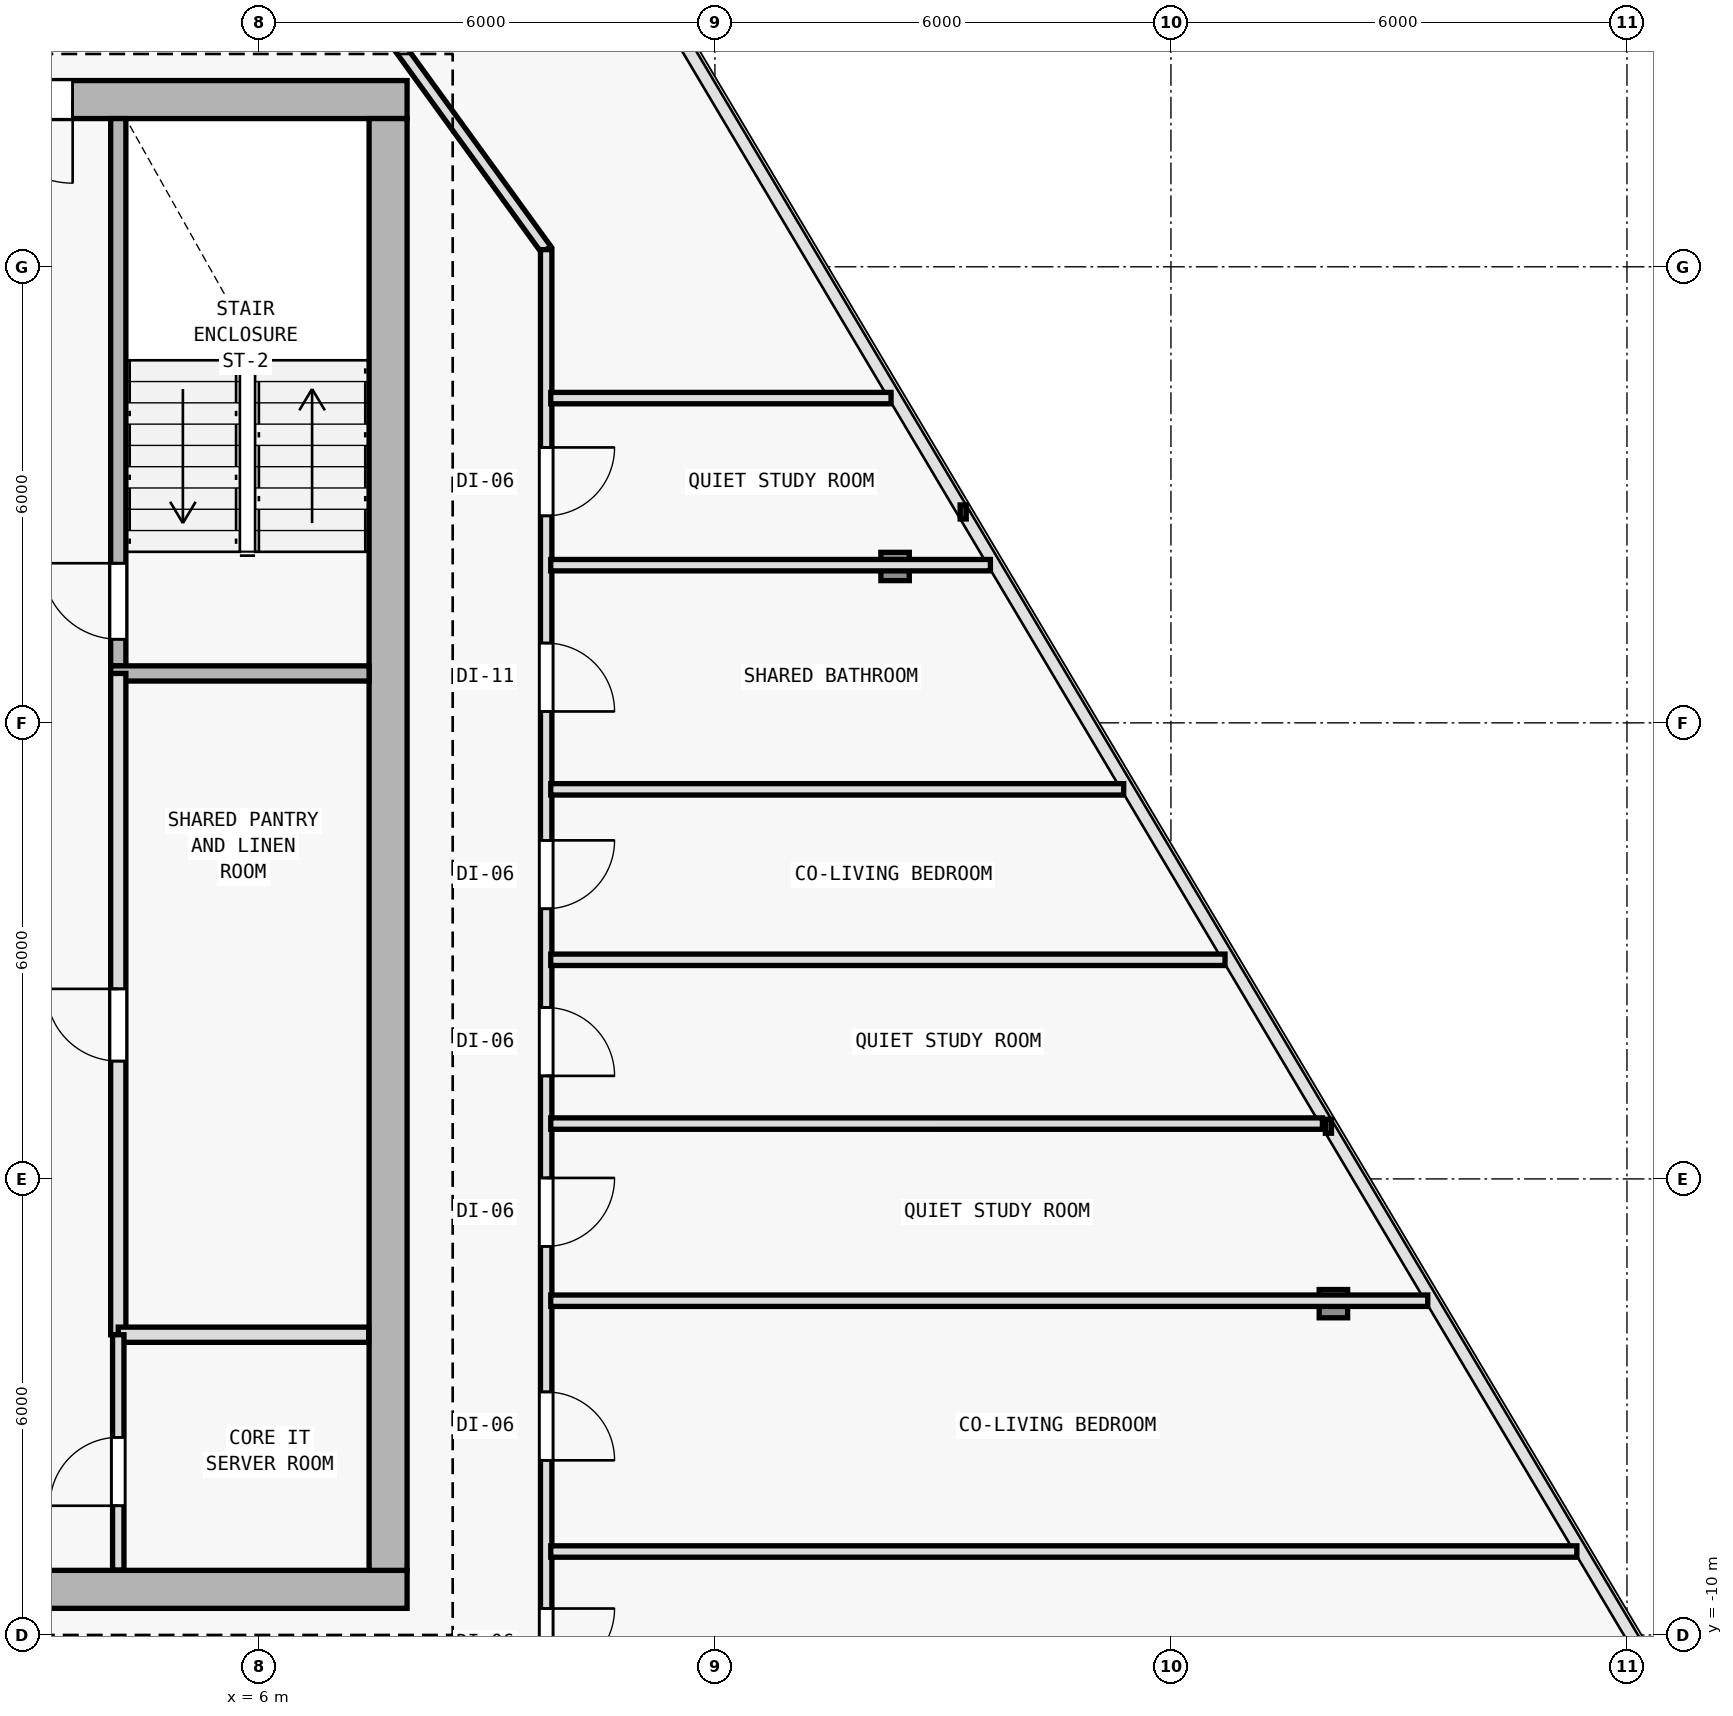
"""IFC4 building model, lengths in metres.
Left out: names, types, materials, properties, quantities, classifications, styles, units other than length and angle.
Written with IfcOpenShell. Run it as: python <this file> out.ifc"""

import sys

from ifc_helpers import new_model, si_unit, direction, frame, frame_2d, origin, origin_2d, place, context, subcontext, project, spatial, rectangle, i_section, extrude, element, fill, save


model = new_model("IFC4")
c1 = context("Model", 3, precision=1e-05, world=origin(), true_north=direction((0.0, 1.0)))
c2 = subcontext(c1, "Body", "Model", "MODEL_VIEW")
j1 = project(units=[si_unit("LENGTHUNIT", "METRE"), si_unit("PLANEANGLEUNIT", "RADIAN")], contexts=[c1])
p1 = place(None, origin())
s1 = spatial("IfcSite", under=j1, at=p1, CompositionType="ELEMENT")
p2 = place(p1, origin())
s2 = spatial("IfcBuilding", under=s1, at=p2, CompositionType="ELEMENT")
p3 = place(p2, frame((0.0, 0.0, 227.1)))
s3 = spatial("IfcBuildingStorey", under=s2, at=p3, CompositionType="ELEMENT", Elevation=227.1)
for number, where, z_axis, x_axis in (
    (1, (7.7, -9.4, 0.0), (0.0, 0.0, 1.0), (1.0, 0.0, 0.0)),
    (2, (7.7, 10.2, 0.0), (0.0, 0.0, 1.0), (1.0, 0.0, 0.0)),
    (3, (7.7, 0.4, 0.0), (0.0, 0.0, 1.0), (1.0, 0.0, 0.0)),
):
    element("IfcColumn", number, at=place(p3, frame(where, z_axis=z_axis, x_axis=x_axis)), inside=s3, PredefinedType="COLUMN", context=c2, shape_type="SweptSolid", body=[
        extrude(i_section(OverallWidth=0.398, OverallDepth=0.387, WebThickness=0.013, FlangeThickness=0.022, FilletRadius=0.015, at=origin_2d()), origin(), (0.0, 0.0, 1.0), 3.6),
    ])
p4 = place(p3, frame((20.138, -5.641, 0.005), z_axis=(-0.026105663043, 0.021618752208, 0.999425396871), x_axis=(-0.637813971185, -0.770190455771, 0.0)))
e4 = element("IfcColumn", 4, at=p4, inside=s3, PredefinedType="COLUMN", context=c2, shape_type="SweptSolid", body=[
    extrude(i_section(OverallWidth=0.374, OverallDepth=0.372, WebThickness=0.012, FlangeThickness=0.02, FilletRadius=0.015, at=origin_2d()), origin(), (0.0, 0.0, 1.0), 3.591),
])
p5 = place(p3, frame((14.371, 4.057, 0.005), z_axis=(-0.018906041, 0.009521027842, 0.999775930718), x_axis=(-0.449781931574, -0.893138406984, 0.0)))
e5 = element("IfcColumn", 5, at=p5, inside=s3, PredefinedType="COLUMN", context=c2, shape_type="SweptSolid", body=[
    extrude(i_section(OverallWidth=0.374, OverallDepth=0.372, WebThickness=0.012, FlangeThickness=0.02, FilletRadius=0.015, at=origin_2d()), origin(), (0.0, 0.0, 1.0), 3.59),
])
p6 = place(p3, frame((-7.95, -9.4, 0.0), z_axis=(0.0, 0.0, 1.0), x_axis=(1.0, 0.0, 0.0)))
e6 = element("IfcWall", 6, at=p6, inside=s3, PredefinedType="SHEAR", context=c2, shape_type="SweptSolid", body=[
    extrude(rectangle(XDim=15.9, YDim=0.5, at=frame_2d((7.95, 0.0))), origin(), (0.0, 0.0, 1.0), 3.35),
])
p7 = place(p6, frame((9.6, 0.0, 0.0)))
e7 = element("IfcOpeningElement", 7, at=p7, cuts=e6, PredefinedType="OPENING", context=c2, shape_type="SweptSolid", body=[
    extrude(rectangle(XDim=1.5, YDim=2.2, at=frame_2d((0.75, 1.1))), frame((0.0, 0.26, 0.0), z_axis=(0.0, -1.0, 0.0), x_axis=(1.0, 0.0, 0.0)), (0.0, 0.0, 1.0), 0.52),
])
p8 = place(p3, frame((7.95, 10.2, 0.0), z_axis=(0.0, 0.0, 1.0), x_axis=(-1.0, 0.0, 0.0)))
e8 = element("IfcWall", 8, at=p8, inside=s3, PredefinedType="SHEAR", context=c2, shape_type="SweptSolid", body=[
    extrude(rectangle(XDim=15.9, YDim=0.5, at=frame_2d((7.95, 0.0))), origin(), (0.0, 0.0, 1.0), 3.35),
])
p9 = place(p8, frame((4.4, 0.0, 0.0)))
e9 = element("IfcOpeningElement", 9, at=p9, cuts=e8, PredefinedType="OPENING", context=c2, shape_type="SweptSolid", body=[
    extrude(rectangle(XDim=1.1, YDim=2.15, at=frame_2d((0.55, 1.075))), frame((0.0, 0.26, 0.0), z_axis=(0.0, -1.0, 0.0), x_axis=(1.0, 0.0, 0.0)), (0.0, 0.0, 1.0), 0.52),
])
p10 = place(p3, frame((7.7, 9.95, 0.0), z_axis=(0.0, 0.0, 1.0), x_axis=(0.0, -1.0, 0.0)))
e10 = element("IfcWall", 10, at=p10, inside=s3, PredefinedType="SHEAR", context=c2, shape_type="SweptSolid", body=[
    extrude(rectangle(XDim=19.1, YDim=0.5, at=frame_2d((9.55, 0.0))), origin(), (0.0, 0.0, 1.0), 3.35),
])
p11 = place(p3, frame((4.15, 2.75, 0.0), z_axis=(0.0, 0.0, 1.0), x_axis=(0.0, 1.0, 0.0)))
e11 = element("IfcWall", 11, at=p11, inside=s3, PredefinedType="SOLIDWALL", context=c2, shape_type="SweptSolid", body=[
    extrude(rectangle(XDim=7.2, YDim=0.2, at=frame_2d((3.6, 0.0))), origin(), (0.0, 0.0, 1.0), 3.35),
])
p12 = place(p11, frame((0.35, 0.0, 0.0)))
e12 = element("IfcOpeningElement", 12, at=p12, cuts=e11, PredefinedType="OPENING", context=c2, shape_type="SweptSolid", body=[
    extrude(rectangle(XDim=1.0, YDim=2.15, at=frame_2d((0.5, 1.075))), frame((0.0, 0.11, 0.0), z_axis=(0.0, -1.0, 0.0), x_axis=(1.0, 0.0, 0.0)), (0.0, 0.0, 1.0), 0.22),
])
p13 = place(p3, frame((4.05, 2.65, 0.0), z_axis=(0.0, 0.0, 1.0), x_axis=(1.0, 0.0, 0.0)))
e13 = element("IfcWall", 13, at=p13, inside=s3, PredefinedType="SOLIDWALL", context=c2, shape_type="SweptSolid", body=[
    extrude(rectangle(XDim=3.4, YDim=0.2, at=frame_2d((1.7, 0.0))), origin(), (0.0, 0.0, 1.0), 3.35),
])
p14 = place(p3, frame((4.15, -6.05, 0.0), z_axis=(0.0, 0.0, 1.0), x_axis=(0.0, 1.0, 0.0)))
e14 = element("IfcWall", 14, at=p14, inside=s3, PredefinedType="SOLIDWALL", context=c2, shape_type="SweptSolid", body=[
    extrude(rectangle(XDim=8.7, YDim=0.2, at=frame_2d((4.35, 0.0))), origin(), (0.0, 0.0, 1.0), 3.35),
])
p15 = place(p14, frame((3.6, 0.0, 0.0)))
e15 = element("IfcOpeningElement", 15, at=p15, cuts=e14, PredefinedType="OPENING", context=c2, shape_type="SweptSolid", body=[
    extrude(rectangle(XDim=0.95, YDim=2.1, at=frame_2d((0.475, 1.05))), frame((0.0, 0.11, 0.0), z_axis=(0.0, -1.0, 0.0), x_axis=(1.0, 0.0, 0.0)), (0.0, 0.0, 1.0), 0.22),
])
p16 = place(p3, frame((4.15, -6.05, 0.0), z_axis=(0.0, 0.0, 1.0), x_axis=(1.0, 0.0, 0.0)))
e16 = element("IfcWall", 16, at=p16, inside=s3, PredefinedType="SOLIDWALL", context=c2, shape_type="SweptSolid", body=[
    extrude(rectangle(XDim=3.295, YDim=0.2, at=frame_2d((1.647, 0.0))), origin(), (0.0, 0.0, 1.0), 3.35),
])
p17 = place(p3, frame((4.15, -9.145, 0.0), z_axis=(0.0, 0.0, 1.0), x_axis=(0.0, 1.0, 0.0)))
e17 = element("IfcWall", 17, at=p17, inside=s3, PredefinedType="PARTITIONING", context=c2, shape_type="SweptSolid", body=[
    extrude(rectangle(XDim=3.095, YDim=0.15, at=frame_2d((1.547, 0.0))), origin(), (0.0, 0.0, 1.0), 3.35),
])
p18 = place(p17, frame((0.845, 0.0, 0.0)))
e18 = element("IfcOpeningElement", 18, at=p18, cuts=e17, PredefinedType="OPENING", context=c2, shape_type="SweptSolid", body=[
    extrude(rectangle(XDim=0.9, YDim=2.1, at=frame_2d((0.45, 1.05))), frame((0.0, 0.085, 0.0), z_axis=(0.0, -1.0, 0.0), x_axis=(1.0, 0.0, 0.0)), (0.0, 0.0, 1.0), 0.17),
])
p19 = place(p3, frame((6.841, 12.28, 0.0), z_axis=(0.0, 0.0, 1.0), x_axis=(0.586956386413, -0.809618552436, 0.0)))
e19 = element("IfcWall", 19, at=p19, inside=s3, PredefinedType="PARTITIONING", context=c2, shape_type="SweptSolid", body=[
    extrude(rectangle(XDim=5.008, YDim=0.15, at=frame_2d((2.504, 0.0))), origin(), (0.0, 0.0, 1.0), 2.925),
])
p20 = place(p3, frame((9.78, 8.226, 0.0), z_axis=(0.0, 0.0, 1.0), x_axis=(0.0, -1.0, 0.0)))
e20 = element("IfcWall", 20, at=p20, inside=s3, PredefinedType="PARTITIONING", context=c2, shape_type="SweptSolid", body=[
    extrude(rectangle(XDim=19.706, YDim=0.15, at=frame_2d((9.853, 0.0))), origin(), (0.0, 0.0, 1.0), 2.825),
])
p21 = place(p20, frame((17.878, 0.0, 0.0)))
e21 = element("IfcOpeningElement", 21, at=p21, cuts=e20, PredefinedType="OPENING", context=c2, shape_type="SweptSolid", body=[
    extrude(rectangle(XDim=0.9, YDim=2.1, at=frame_2d((0.45, 1.05))), frame((0.0, 0.085, 0.0), z_axis=(0.0, -1.0, 0.0), x_axis=(1.0, 0.0, 0.0)), (0.0, 0.0, 1.0), 0.17),
])
p22 = place(p20, frame((15.028, 0.0, 0.0)))
e22 = element("IfcOpeningElement", 22, at=p22, cuts=e20, PredefinedType="OPENING", context=c2, shape_type="SweptSolid", body=[
    extrude(rectangle(XDim=0.9, YDim=2.1, at=frame_2d((0.45, 1.05))), frame((0.0, 0.085, 0.0), z_axis=(0.0, -1.0, 0.0), x_axis=(1.0, 0.0, 0.0)), (0.0, 0.0, 1.0), 0.17),
])
p23 = place(p20, frame((12.213, 0.0, 0.0)))
e23 = element("IfcOpeningElement", 23, at=p23, cuts=e20, PredefinedType="OPENING", context=c2, shape_type="SweptSolid", body=[
    extrude(rectangle(XDim=0.9, YDim=2.1, at=frame_2d((0.45, 1.05))), frame((0.0, 0.085, 0.0), z_axis=(0.0, -1.0, 0.0), x_axis=(1.0, 0.0, 0.0)), (0.0, 0.0, 1.0), 0.17),
])
p24 = place(p20, frame((9.971, 0.0, 0.0)))
e24 = element("IfcOpeningElement", 24, at=p24, cuts=e20, PredefinedType="OPENING", context=c2, shape_type="SweptSolid", body=[
    extrude(rectangle(XDim=0.9, YDim=2.1, at=frame_2d((0.45, 1.05))), frame((0.0, 0.085, 0.0), z_axis=(0.0, -1.0, 0.0), x_axis=(1.0, 0.0, 0.0)), (0.0, 0.0, 1.0), 0.17),
])
p25 = place(p20, frame((7.772, 0.0, 0.0)))
e25 = element("IfcOpeningElement", 25, at=p25, cuts=e20, PredefinedType="OPENING", context=c2, shape_type="SweptSolid", body=[
    extrude(rectangle(XDim=0.9, YDim=2.1, at=frame_2d((0.45, 1.05))), frame((0.0, 0.085, 0.0), z_axis=(0.0, -1.0, 0.0), x_axis=(1.0, 0.0, 0.0)), (0.0, 0.0, 1.0), 0.17),
])
p26 = place(p20, frame((5.176, 0.0, 0.0)))
e26 = element("IfcOpeningElement", 26, at=p26, cuts=e20, PredefinedType="OPENING", context=c2, shape_type="SweptSolid", body=[
    extrude(rectangle(XDim=0.9, YDim=2.1, at=frame_2d((0.45, 1.05))), frame((0.0, 0.085, 0.0), z_axis=(0.0, -1.0, 0.0), x_axis=(1.0, 0.0, 0.0)), (0.0, 0.0, 1.0), 0.17),
])
p27 = place(p20, frame((2.603, 0.0, 0.0)))
e27 = element("IfcOpeningElement", 27, at=p27, cuts=e20, PredefinedType="OPENING", context=c2, shape_type="SweptSolid", body=[
    extrude(rectangle(XDim=0.9, YDim=2.1, at=frame_2d((0.45, 1.05))), frame((0.0, 0.085, 0.0), z_axis=(0.0, -1.0, 0.0), x_axis=(1.0, 0.0, 0.0)), (0.0, 0.0, 1.0), 0.17),
])
p28 = place(p3, frame((9.84, -5.603, 0.0), z_axis=(0.0, 0.0, 1.0), x_axis=(1.0, 0.0, 0.0)))
e28 = element("IfcWall", 28, at=p28, inside=s3, PredefinedType="PARTITIONING", context=c2, shape_type="SweptSolid", body=[
    extrude(rectangle(XDim=11.539, YDim=0.15, at=frame_2d((5.769, 0.0))), origin(), (0.0, 0.0, 1.0), 2.875),
])
p29 = place(p3, frame((9.84, 4.074, 0.0), z_axis=(0.0, 0.0, 1.0), x_axis=(1.0, 0.0, 0.0)))
e29 = element("IfcWall", 29, at=p29, inside=s3, PredefinedType="PARTITIONING", context=c2, shape_type="SweptSolid", body=[
    extrude(rectangle(XDim=5.784, YDim=0.15, at=frame_2d((2.892, 0.0))), origin(), (0.0, 0.0, 1.0), 2.925),
])
p30 = place(p3, frame((9.84, -1.117, 0.0), z_axis=(0.0, 0.0, 1.0), x_axis=(1.0, 0.0, 0.0)))
e30 = element("IfcWall", 30, at=p30, inside=s3, PredefinedType="PARTITIONING", context=c2, shape_type="SweptSolid", body=[
    extrude(rectangle(XDim=8.872, YDim=0.15, at=frame_2d((4.436, 0.0))), origin(), (0.0, 0.0, 1.0), 2.875),
])
p31 = place(p3, frame((9.84, -8.902, 0.0), z_axis=(0.0, 0.0, 1.0), x_axis=(1.0, 0.0, 0.0)))
e31 = element("IfcWall", 31, at=p31, inside=s3, PredefinedType="PARTITIONING", context=c2, shape_type="SweptSolid", body=[
    extrude(rectangle(XDim=13.501, YDim=0.15, at=frame_2d((6.75, 0.0))), origin(), (0.0, 0.0, 1.0), 2.875),
])
p32 = place(p3, frame((9.84, -3.272, 0.0), z_axis=(0.0, 0.0, 1.0), x_axis=(1.0, 0.0, 0.0)))
e32 = element("IfcWall", 32, at=p32, inside=s3, PredefinedType="PARTITIONING", context=c2, shape_type="SweptSolid", body=[
    extrude(rectangle(XDim=10.153, YDim=0.15, at=frame_2d((5.076, 0.0))), origin(), (0.0, 0.0, 1.0), 2.875),
])
p33 = place(p3, frame((9.84, 1.125, 0.0), z_axis=(0.0, 0.0, 1.0), x_axis=(1.0, 0.0, 0.0)))
e33 = element("IfcWall", 33, at=p33, inside=s3, PredefinedType="PARTITIONING", context=c2, shape_type="SweptSolid", body=[
    extrude(rectangle(XDim=7.538, YDim=0.15, at=frame_2d((3.769, 0.0))), origin(), (0.0, 0.0, 1.0), 2.875),
])
p34 = place(p3, frame((9.84, 6.272, 0.0), z_axis=(0.0, 0.0, 1.0), x_axis=(1.0, 0.0, 0.0)))
e34 = element("IfcWall", 34, at=p34, inside=s3, PredefinedType="PARTITIONING", context=c2, shape_type="SweptSolid", body=[
    extrude(rectangle(XDim=4.477, YDim=0.15, at=frame_2d((2.239, 0.0))), origin(), (0.0, 0.0, 1.0), 2.925),
])
p35 = place(p9, origin())
e35 = element("IfcDoor", 35, at=p35, inside=s3, OperationType="SINGLE_SWING_LEFT", PredefinedType="DOOR", context=c2, shape_type="SweptSolid", body=[
    extrude(rectangle(XDim=1.1, YDim=2.15, at=frame_2d((0.55, 1.075))), frame((0.0, 0.025, 0.0), z_axis=(0.0, -1.0, 0.0), x_axis=(1.0, 0.0, 0.0)), (0.0, 0.0, 1.0), 0.05),
])
fill(e9, e35)
p36 = place(p12, origin())
e36 = element("IfcDoor", 36, at=p36, inside=s3, OperationType="SINGLE_SWING_RIGHT", PredefinedType="DOOR", context=c2, shape_type="SweptSolid", body=[
    extrude(rectangle(XDim=1.0, YDim=2.15, at=frame_2d((0.5, 1.075))), frame((0.0, 0.025, 0.0), z_axis=(0.0, -1.0, 0.0), x_axis=(1.0, 0.0, 0.0)), (0.0, 0.0, 1.0), 0.05),
])
fill(e12, e36)
p37 = place(p15, origin())
e37 = element("IfcDoor", 37, at=p37, inside=s3, OperationType="SINGLE_SWING_RIGHT", PredefinedType="DOOR", context=c2, shape_type="SweptSolid", body=[
    extrude(rectangle(XDim=0.95, YDim=2.1, at=frame_2d((0.475, 1.05))), frame((0.0, 0.025, 0.0), z_axis=(0.0, -1.0, 0.0), x_axis=(1.0, 0.0, 0.0)), (0.0, 0.0, 1.0), 0.05),
])
fill(e15, e37)
p38 = place(p18, origin())
e38 = element("IfcDoor", 38, at=p38, inside=s3, OperationType="SINGLE_SWING_LEFT", PredefinedType="DOOR", context=c2, shape_type="SweptSolid", body=[
    extrude(rectangle(XDim=0.9, YDim=2.1, at=frame_2d((0.45, 1.05))), frame((0.0, 0.025, 0.0), z_axis=(0.0, -1.0, 0.0), x_axis=(1.0, 0.0, 0.0)), (0.0, 0.0, 1.0), 0.05),
])
fill(e18, e38)
p39 = place(p21, origin())
e39 = element("IfcDoor", 39, at=p39, inside=s3, OperationType="SINGLE_SWING_LEFT", PredefinedType="DOOR", context=c2, shape_type="SweptSolid", body=[
    extrude(rectangle(XDim=0.9, YDim=2.1, at=frame_2d((0.45, 1.05))), frame((0.0, 0.025, 0.0), z_axis=(0.0, -1.0, 0.0), x_axis=(1.0, 0.0, 0.0)), (0.0, 0.0, 1.0), 0.05),
])
fill(e21, e39)
p40 = place(p22, origin())
e40 = element("IfcDoor", 40, at=p40, inside=s3, OperationType="SINGLE_SWING_RIGHT", PredefinedType="DOOR", context=c2, shape_type="SweptSolid", body=[
    extrude(rectangle(XDim=0.9, YDim=2.1, at=frame_2d((0.45, 1.05))), frame((0.0, 0.025, 0.0), z_axis=(0.0, -1.0, 0.0), x_axis=(1.0, 0.0, 0.0)), (0.0, 0.0, 1.0), 0.05),
])
fill(e22, e40)
p41 = place(p23, origin())
e41 = element("IfcDoor", 41, at=p41, inside=s3, OperationType="SINGLE_SWING_LEFT", PredefinedType="DOOR", context=c2, shape_type="SweptSolid", body=[
    extrude(rectangle(XDim=0.9, YDim=2.1, at=frame_2d((0.45, 1.05))), frame((0.0, 0.025, 0.0), z_axis=(0.0, -1.0, 0.0), x_axis=(1.0, 0.0, 0.0)), (0.0, 0.0, 1.0), 0.05),
])
fill(e23, e41)
p42 = place(p24, origin())
e42 = element("IfcDoor", 42, at=p42, inside=s3, OperationType="SINGLE_SWING_RIGHT", PredefinedType="DOOR", context=c2, shape_type="SweptSolid", body=[
    extrude(rectangle(XDim=0.9, YDim=2.1, at=frame_2d((0.45, 1.05))), frame((0.0, 0.025, 0.0), z_axis=(0.0, -1.0, 0.0), x_axis=(1.0, 0.0, 0.0)), (0.0, 0.0, 1.0), 0.05),
])
fill(e24, e42)
p43 = place(p25, origin())
e43 = element("IfcDoor", 43, at=p43, inside=s3, OperationType="SINGLE_SWING_LEFT", PredefinedType="DOOR", context=c2, shape_type="SweptSolid", body=[
    extrude(rectangle(XDim=0.9, YDim=2.1, at=frame_2d((0.45, 1.05))), frame((0.0, 0.025, 0.0), z_axis=(0.0, -1.0, 0.0), x_axis=(1.0, 0.0, 0.0)), (0.0, 0.0, 1.0), 0.05),
])
fill(e25, e43)
p44 = place(p26, origin())
e44 = element("IfcDoor", 44, at=p44, inside=s3, OperationType="SINGLE_SWING_RIGHT", PredefinedType="DOOR", context=c2, shape_type="SweptSolid", body=[
    extrude(rectangle(XDim=0.9, YDim=2.1, at=frame_2d((0.45, 1.05))), frame((0.0, 0.025, 0.0), z_axis=(0.0, -1.0, 0.0), x_axis=(1.0, 0.0, 0.0)), (0.0, 0.0, 1.0), 0.05),
])
fill(e26, e44)
p45 = place(p27, origin())
e45 = element("IfcDoor", 45, at=p45, inside=s3, OperationType="SINGLE_SWING_LEFT", PredefinedType="DOOR", context=c2, shape_type="SweptSolid", body=[
    extrude(rectangle(XDim=0.9, YDim=2.1, at=frame_2d((0.45, 1.05))), frame((0.0, 0.025, 0.0), z_axis=(0.0, -1.0, 0.0), x_axis=(1.0, 0.0, 0.0)), (0.0, 0.0, 1.0), 0.05),
])
fill(e27, e45)
save(model, sys.argv[1])
